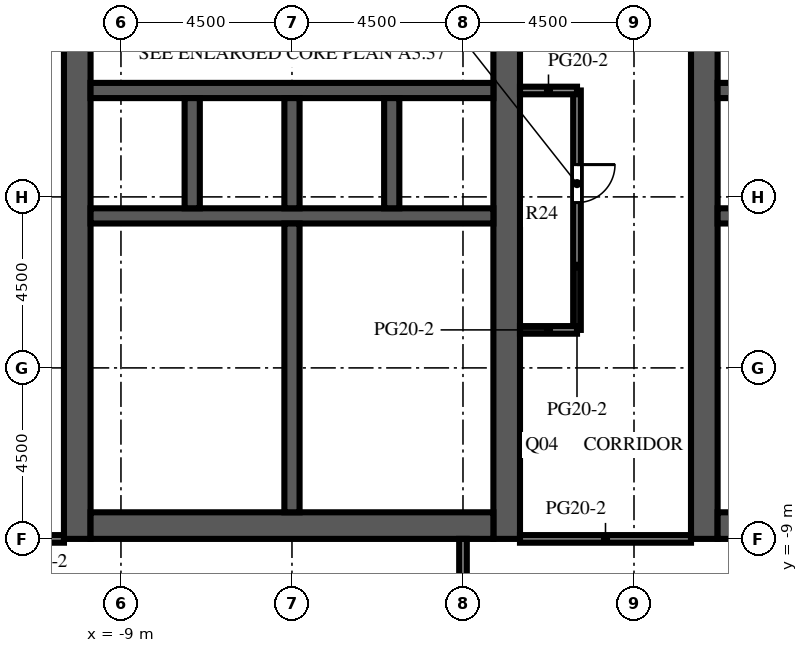
"""IFC4 building model, lengths in metres.
Left out: names, types, materials, properties, quantities, classifications, styles, units other than length and angle.
Written with IfcOpenShell. Run it as: python <this file> out.ifc"""

import sys

from ifc_helpers import new_model, si_unit, direction, frame, frame_2d, origin, place, context, subcontext, project, spatial, rectangle, extrude, element, fill, save


model = new_model("IFC4")
c1 = context("Model", 3, precision=1e-05, world=origin(), true_north=direction((0.0, 1.0)))
c2 = subcontext(c1, "Body", "Model", "MODEL_VIEW")
j1 = project(units=[si_unit("LENGTHUNIT", "METRE"), si_unit("PLANEANGLEUNIT", "RADIAN")], contexts=[c1])
p1 = place(None, origin())
s1 = spatial("IfcSite", under=j1, at=p1, CompositionType="ELEMENT")
p2 = place(p1, origin())
s2 = spatial("IfcBuilding", under=s1, at=p2, CompositionType="ELEMENT")
p3 = place(p2, frame((0.0, 0.0, 256.2)))
s3 = spatial("IfcBuildingStorey", under=s2, at=p3, CompositionType="ELEMENT", Elevation=256.2)
p4 = place(p3, frame((-10.15, -9.0, 0.0), z_axis=(0.0, 0.0, 1.0), x_axis=(0.0, 1.0, 0.0)))
e1 = element("IfcWall", 1, at=p4, inside=s3, PredefinedType="SHEAR", context=c2, shape_type="SweptSolid", body=[
    extrude(rectangle(XDim=27.5, YDim=0.7, at=frame_2d((13.75, 0.0))), origin(), (0.0, 0.0, 1.0), 4.1),
])
p5 = place(p4, frame((12.55, 0.0, 0.0)))
e2 = element("IfcOpeningElement", 2, at=p5, cuts=e1, PredefinedType="OPENING", context=c2, shape_type="SweptSolid", body=[
    extrude(rectangle(XDim=2.4, YDim=2.4, at=frame_2d((1.2, 1.2))), frame((0.0, 0.36, 0.0), z_axis=(0.0, -1.0, 0.0), x_axis=(1.0, 0.0, 0.0)), (0.0, 0.0, 1.0), 0.72),
])
p6 = place(p4, frame((6.825, 0.0, 0.0)))
e3 = element("IfcOpeningElement", 3, at=p6, cuts=e1, PredefinedType="OPENING", context=c2, shape_type="SweptSolid", body=[
    extrude(rectangle(XDim=1.2, YDim=2.1, at=frame_2d((0.6, 1.05))), frame((0.0, 0.36, 0.0), z_axis=(0.0, -1.0, 0.0), x_axis=(1.0, 0.0, 0.0)), (0.0, 0.0, 1.0), 0.72),
])
p7 = place(p4, frame((19.475, 0.0, 0.0)))
e4 = element("IfcOpeningElement", 4, at=p7, cuts=e1, PredefinedType="OPENING", context=c2, shape_type="SweptSolid", body=[
    extrude(rectangle(XDim=1.2, YDim=2.1, at=frame_2d((0.6, 1.05))), frame((0.0, 0.36, 0.0), z_axis=(0.0, -1.0, 0.0), x_axis=(1.0, 0.0, 0.0)), (0.0, 0.0, 1.0), 0.72),
])
p8 = place(p3, frame((1.15, -9.0, 0.0), z_axis=(0.0, 0.0, 1.0), x_axis=(0.0, 1.0, 0.0)))
e5 = element("IfcWall", 5, at=p8, inside=s3, PredefinedType="SHEAR", context=c2, shape_type="SweptSolid", body=[
    extrude(rectangle(XDim=27.5, YDim=0.7, at=frame_2d((13.75, 0.0))), origin(), (0.0, 0.0, 1.0), 4.1),
])
p9 = place(p8, frame((12.55, 0.0, 0.0)))
e6 = element("IfcOpeningElement", 6, at=p9, cuts=e5, PredefinedType="OPENING", context=c2, shape_type="SweptSolid", body=[
    extrude(rectangle(XDim=2.4, YDim=2.4, at=frame_2d((1.2, 1.2))), frame((0.0, 0.36, 0.0), z_axis=(0.0, -1.0, 0.0), x_axis=(1.0, 0.0, 0.0)), (0.0, 0.0, 1.0), 0.72),
])
p10 = place(p8, frame((3.788, 0.0, 0.0)))
e7 = element("IfcOpeningElement", 7, at=p10, cuts=e5, PredefinedType="OPENING", context=c2, shape_type="SweptSolid", body=[
    extrude(rectangle(XDim=0.968, YDim=2.1, at=frame_2d((0.484, 1.05))), frame((0.0, 0.36, 0.0), z_axis=(0.0, -1.0, 0.0), x_axis=(1.0, 0.0, 0.0)), (0.0, 0.0, 1.0), 0.72),
])
p11 = place(p8, frame((23.54, 0.0, 0.0)))
e8 = element("IfcOpeningElement", 8, at=p11, cuts=e5, PredefinedType="OPENING", context=c2, shape_type="SweptSolid", body=[
    extrude(rectangle(XDim=1.2, YDim=2.1, at=frame_2d((0.6, 1.05))), frame((0.0, 0.36, 0.0), z_axis=(0.0, -1.0, 0.0), x_axis=(1.0, 0.0, 0.0)), (0.0, 0.0, 1.0), 0.72),
])
p12 = place(p3, frame((-9.8, -8.65, 0.0), z_axis=(0.0, 0.0, 1.0), x_axis=(1.0, 0.0, 0.0)))
e9 = element("IfcWall", 9, at=p12, inside=s3, PredefinedType="SHEAR", context=c2, shape_type="SweptSolid", body=[
    extrude(rectangle(XDim=10.6, YDim=0.7, at=frame_2d((5.3, 0.0))), origin(), (0.0, 0.0, 1.0), 4.1),
])
p13 = place(p3, frame((-9.8, -0.5, 0.0), z_axis=(0.0, 0.0, 1.0), x_axis=(1.0, 0.0, 0.0)))
e10 = element("IfcWall", 10, at=p13, inside=s3, PredefinedType="SHEAR", context=c2, shape_type="SweptSolid", body=[
    extrude(rectangle(XDim=10.6, YDim=0.4, at=frame_2d((5.3, 0.0))), origin(), (0.0, 0.0, 1.0), 4.1),
])
p14 = place(p3, frame((-9.8, 2.8, 0.0), z_axis=(0.0, 0.0, 1.0), x_axis=(1.0, 0.0, 0.0)))
e11 = element("IfcWall", 11, at=p14, inside=s3, PredefinedType="SHEAR", context=c2, shape_type="SweptSolid", body=[
    extrude(rectangle(XDim=10.6, YDim=0.4, at=frame_2d((5.3, 0.0))), origin(), (0.0, 0.0, 1.0), 4.1),
])
p15 = place(p14, frame((0.688, 0.0, 0.0)))
e12 = element("IfcOpeningElement", 12, at=p15, cuts=e11, PredefinedType="OPENING", context=c2, shape_type="SweptSolid", body=[
    extrude(rectangle(XDim=1.1, YDim=2.1, at=frame_2d((0.55, 1.05))), frame((0.0, 0.21, 0.0), z_axis=(0.0, -1.0, 0.0), x_axis=(1.0, 0.0, 0.0)), (0.0, 0.0, 1.0), 0.42),
])
p16 = place(p14, frame((3.438, 0.0, 0.0)))
e13 = element("IfcOpeningElement", 13, at=p16, cuts=e11, PredefinedType="OPENING", context=c2, shape_type="SweptSolid", body=[
    extrude(rectangle(XDim=1.1, YDim=2.1, at=frame_2d((0.55, 1.05))), frame((0.0, 0.21, 0.0), z_axis=(0.0, -1.0, 0.0), x_axis=(1.0, 0.0, 0.0)), (0.0, 0.0, 1.0), 0.42),
])
p17 = place(p14, frame((6.113, 0.0, 0.0)))
e14 = element("IfcOpeningElement", 14, at=p17, cuts=e11, PredefinedType="OPENING", context=c2, shape_type="SweptSolid", body=[
    extrude(rectangle(XDim=1.0, YDim=2.1, at=frame_2d((0.5, 1.05))), frame((0.0, 0.21, 0.0), z_axis=(0.0, -1.0, 0.0), x_axis=(1.0, 0.0, 0.0)), (0.0, 0.0, 1.0), 0.42),
])
p18 = place(p14, frame((8.863, 0.0, 0.0)))
e15 = element("IfcOpeningElement", 15, at=p18, cuts=e11, PredefinedType="OPENING", context=c2, shape_type="SweptSolid", body=[
    extrude(rectangle(XDim=1.0, YDim=2.1, at=frame_2d((0.5, 1.05))), frame((0.0, 0.21, 0.0), z_axis=(0.0, -1.0, 0.0), x_axis=(1.0, 0.0, 0.0)), (0.0, 0.0, 1.0), 0.42),
])
for number, where, z_axis, x_axis in (
    (16, (-7.125, -0.3, 0.0), (0.0, 0.0, 1.0), (0.0, 1.0, 0.0)),
    (17, (-4.5, -0.3, 0.0), (0.0, 0.0, 1.0), (0.0, 1.0, 0.0)),
    (18, (-1.875, -0.3, 0.0), (0.0, 0.0, 1.0), (0.0, 1.0, 0.0)),
):
    element("IfcWall", number, at=place(p3, frame(where, z_axis=z_axis, x_axis=x_axis)), inside=s3, PredefinedType="SHEAR", context=c2, shape_type="SweptSolid", body=[
        extrude(rectangle(XDim=2.9, YDim=0.4, at=frame_2d((1.45, 0.0))), origin(), (0.0, 0.0, 1.0), 4.1),
    ])
p19 = place(p3, frame((-4.5, -8.3, 0.0), z_axis=(0.0, 0.0, 1.0), x_axis=(0.0, 1.0, 0.0)))
e19 = element("IfcWall", 19, at=p19, inside=s3, PredefinedType="SHEAR", context=c2, shape_type="SweptSolid", body=[
    extrude(rectangle(XDim=7.6, YDim=0.4, at=frame_2d((3.8, 0.0))), origin(), (0.0, 0.0, 1.0), 4.1),
])
p20 = place(p3, frame((6.35, -9.0, 0.0), z_axis=(0.0, 0.0, 1.0), x_axis=(0.0, 1.0, 0.0)))
e20 = element("IfcWall", 20, at=p20, inside=s3, PredefinedType="SHEAR", context=c2, shape_type="SweptSolid", body=[
    extrude(rectangle(XDim=27.5, YDim=0.7, at=frame_2d((13.75, 0.0))), origin(), (0.0, 0.0, 1.0), 4.1),
])
p21 = place(p20, frame((12.55, 0.0, 0.0)))
e21 = element("IfcOpeningElement", 21, at=p21, cuts=e20, PredefinedType="OPENING", context=c2, shape_type="SweptSolid", body=[
    extrude(rectangle(XDim=2.4, YDim=2.4, at=frame_2d((1.2, 1.2))), frame((0.0, 0.36, 0.0), z_axis=(0.0, -1.0, 0.0), x_axis=(1.0, 0.0, 0.0)), (0.0, 0.0, 1.0), 0.72),
])
p22 = place(p20, frame((3.788, 0.0, 0.0)))
e22 = element("IfcOpeningElement", 22, at=p22, cuts=e20, PredefinedType="OPENING", context=c2, shape_type="SweptSolid", body=[
    extrude(rectangle(XDim=0.968, YDim=2.1, at=frame_2d((0.484, 1.05))), frame((0.0, 0.36, 0.0), z_axis=(0.0, -1.0, 0.0), x_axis=(1.0, 0.0, 0.0)), (0.0, 0.0, 1.0), 0.72),
])
p23 = place(p20, frame((23.54, 0.0, 0.0)))
e23 = element("IfcOpeningElement", 23, at=p23, cuts=e20, PredefinedType="OPENING", context=c2, shape_type="SweptSolid", body=[
    extrude(rectangle(XDim=1.2, YDim=2.1, at=frame_2d((0.6, 1.05))), frame((0.0, 0.36, 0.0), z_axis=(0.0, -1.0, 0.0), x_axis=(1.0, 0.0, 0.0)), (0.0, 0.0, 1.0), 0.72),
])
p24 = place(p3, frame((6.7, -8.65, 0.0), z_axis=(0.0, 0.0, 1.0), x_axis=(1.0, 0.0, 0.0)))
e24 = element("IfcWall", 24, at=p24, inside=s3, PredefinedType="SHEAR", context=c2, shape_type="SweptSolid", body=[
    extrude(rectangle(XDim=10.6, YDim=0.7, at=frame_2d((5.3, 0.0))), origin(), (0.0, 0.0, 1.0), 4.1),
])
p25 = place(p3, frame((6.7, -0.5, 0.0), z_axis=(0.0, 0.0, 1.0), x_axis=(1.0, 0.0, 0.0)))
e25 = element("IfcWall", 25, at=p25, inside=s3, PredefinedType="SHEAR", context=c2, shape_type="SweptSolid", body=[
    extrude(rectangle(XDim=10.6, YDim=0.4, at=frame_2d((5.3, 0.0))), origin(), (0.0, 0.0, 1.0), 4.1),
])
p26 = place(p3, frame((6.7, 2.8, 0.0), z_axis=(0.0, 0.0, 1.0), x_axis=(1.0, 0.0, 0.0)))
e26 = element("IfcWall", 26, at=p26, inside=s3, PredefinedType="SHEAR", context=c2, shape_type="SweptSolid", body=[
    extrude(rectangle(XDim=10.6, YDim=0.4, at=frame_2d((5.3, 0.0))), origin(), (0.0, 0.0, 1.0), 4.1),
])
p27 = place(p26, frame((0.688, 0.0, 0.0)))
e27 = element("IfcOpeningElement", 27, at=p27, cuts=e26, PredefinedType="OPENING", context=c2, shape_type="SweptSolid", body=[
    extrude(rectangle(XDim=1.1, YDim=2.1, at=frame_2d((0.55, 1.05))), frame((0.0, 0.21, 0.0), z_axis=(0.0, -1.0, 0.0), x_axis=(1.0, 0.0, 0.0)), (0.0, 0.0, 1.0), 0.42),
])
p28 = place(p26, frame((3.438, 0.0, 0.0)))
e28 = element("IfcOpeningElement", 28, at=p28, cuts=e26, PredefinedType="OPENING", context=c2, shape_type="SweptSolid", body=[
    extrude(rectangle(XDim=1.1, YDim=2.1, at=frame_2d((0.55, 1.05))), frame((0.0, 0.21, 0.0), z_axis=(0.0, -1.0, 0.0), x_axis=(1.0, 0.0, 0.0)), (0.0, 0.0, 1.0), 0.42),
])
p29 = place(p26, frame((6.113, 0.0, 0.0)))
e29 = element("IfcOpeningElement", 29, at=p29, cuts=e26, PredefinedType="OPENING", context=c2, shape_type="SweptSolid", body=[
    extrude(rectangle(XDim=1.0, YDim=2.1, at=frame_2d((0.5, 1.05))), frame((0.0, 0.21, 0.0), z_axis=(0.0, -1.0, 0.0), x_axis=(1.0, 0.0, 0.0)), (0.0, 0.0, 1.0), 0.42),
])
p30 = place(p26, frame((8.863, 0.0, 0.0)))
e30 = element("IfcOpeningElement", 30, at=p30, cuts=e26, PredefinedType="OPENING", context=c2, shape_type="SweptSolid", body=[
    extrude(rectangle(XDim=1.0, YDim=2.1, at=frame_2d((0.5, 1.05))), frame((0.0, 0.21, 0.0), z_axis=(0.0, -1.0, 0.0), x_axis=(1.0, 0.0, 0.0)), (0.0, 0.0, 1.0), 0.42),
])
p31 = place(p3, frame((-4.3, -5.412, 0.0), z_axis=(0.0, 0.0, 1.0), x_axis=(1.0, 0.0, 0.0)))
e31 = element("IfcWall", 31, at=p31, inside=s3, PredefinedType="PARTITIONING", context=c2, shape_type="SweptSolid", body=[
    extrude(rectangle(XDim=5.1, YDim=0.1, at=frame_2d((2.55, 0.0))), origin(), (0.0, 0.0, 1.0), 3.5),
])
p32 = place(p31, frame((2.05, 0.0, 0.0)))
e32 = element("IfcOpeningElement", 32, at=p32, cuts=e31, PredefinedType="OPENING", context=c2, shape_type="SweptSolid", body=[
    extrude(rectangle(XDim=1.0, YDim=2.1, at=frame_2d((0.5, 1.05))), frame((0.0, 0.06, 0.0), z_axis=(0.0, -1.0, 0.0), x_axis=(1.0, 0.0, 0.0)), (0.0, 0.0, 1.0), 0.12),
])
p33 = place(p3, frame((-2.362, -4.044, 0.0), z_axis=(0.0, 0.0, 1.0), x_axis=(1.0, 0.0, 0.0)))
e33 = element("IfcWall", 33, at=p33, inside=s3, PredefinedType="PARTITIONING", context=c2, shape_type="SweptSolid", body=[
    extrude(rectangle(XDim=3.162, YDim=0.1, at=frame_2d((1.581, 0.0))), origin(), (0.0, 0.0, 1.0), 3.5),
])
p34 = place(p33, frame((1.081, 0.0, 0.0)))
e34 = element("IfcOpeningElement", 34, at=p34, cuts=e33, PredefinedType="OPENING", context=c2, shape_type="SweptSolid", body=[
    extrude(rectangle(XDim=1.0, YDim=2.1, at=frame_2d((0.5, 1.05))), frame((0.0, 0.06, 0.0), z_axis=(0.0, -1.0, 0.0), x_axis=(1.0, 0.0, 0.0)), (0.0, 0.0, 1.0), 0.12),
])
p35 = place(p3, frame((-4.3, -4.044, 0.0), z_axis=(0.0, 0.0, 1.0), x_axis=(1.0, 0.0, 0.0)))
e35 = element("IfcWall", 35, at=p35, inside=s3, PredefinedType="PARTITIONING", context=c2, shape_type="SweptSolid", body=[
    extrude(rectangle(XDim=1.938, YDim=0.1, at=frame_2d((0.969, 0.0))), origin(), (0.0, 0.0, 1.0), 3.5),
])
p36 = place(p35, frame((0.469, 0.0, 0.0)))
e36 = element("IfcOpeningElement", 36, at=p36, cuts=e35, PredefinedType="OPENING", context=c2, shape_type="SweptSolid", body=[
    extrude(rectangle(XDim=1.0, YDim=2.1, at=frame_2d((0.5, 1.05))), frame((0.0, 0.06, 0.0), z_axis=(0.0, -1.0, 0.0), x_axis=(1.0, 0.0, 0.0)), (0.0, 0.0, 1.0), 0.12),
])
p37 = place(p3, frame((-2.362, -4.044, 0.0), z_axis=(0.0, 0.0, 1.0), x_axis=(0.0, 1.0, 0.0)))
e37 = element("IfcWall", 37, at=p37, inside=s3, PredefinedType="PARTITIONING", context=c2, shape_type="SweptSolid", body=[
    extrude(rectangle(XDim=3.344, YDim=0.1, at=frame_2d((1.672, 0.0))), origin(), (0.0, 0.0, 1.0), 3.5),
])
p38 = place(p3, frame((6.7, -5.412, 0.0), z_axis=(0.0, 0.0, 1.0), x_axis=(1.0, 0.0, 0.0)))
e38 = element("IfcWall", 38, at=p38, inside=s3, PredefinedType="PARTITIONING", context=c2, shape_type="SweptSolid", body=[
    extrude(rectangle(XDim=5.1, YDim=0.1, at=frame_2d((2.55, 0.0))), origin(), (0.0, 0.0, 1.0), 3.5),
])
p39 = place(p38, frame((2.05, 0.0, 0.0)))
e39 = element("IfcOpeningElement", 39, at=p39, cuts=e38, PredefinedType="OPENING", context=c2, shape_type="SweptSolid", body=[
    extrude(rectangle(XDim=1.0, YDim=2.1, at=frame_2d((0.5, 1.05))), frame((0.0, 0.06, 0.0), z_axis=(0.0, -1.0, 0.0), x_axis=(1.0, 0.0, 0.0)), (0.0, 0.0, 1.0), 0.12),
])
p40 = place(p3, frame((6.7, -4.044, 0.0), z_axis=(0.0, 0.0, 1.0), x_axis=(1.0, 0.0, 0.0)))
e40 = element("IfcWall", 40, at=p40, inside=s3, PredefinedType="PARTITIONING", context=c2, shape_type="SweptSolid", body=[
    extrude(rectangle(XDim=3.162, YDim=0.1, at=frame_2d((1.581, 0.0))), origin(), (0.0, 0.0, 1.0), 3.5),
])
p41 = place(p40, frame((1.081, 0.0, 0.0)))
e41 = element("IfcOpeningElement", 41, at=p41, cuts=e40, PredefinedType="OPENING", context=c2, shape_type="SweptSolid", body=[
    extrude(rectangle(XDim=1.0, YDim=2.1, at=frame_2d((0.5, 1.05))), frame((0.0, 0.06, 0.0), z_axis=(0.0, -1.0, 0.0), x_axis=(1.0, 0.0, 0.0)), (0.0, 0.0, 1.0), 0.12),
])
p42 = place(p3, frame((0.0, -17.5, 0.0), z_axis=(0.0, 0.0, 1.0), x_axis=(0.0, 1.0, 0.0)))
e42 = element("IfcWall", 42, at=p42, inside=s3, PredefinedType="PARTITIONING", context=c2, shape_type="SweptSolid", body=[
    extrude(rectangle(XDim=8.5, YDim=0.2, at=frame_2d((4.25, 0.0))), origin(), (0.0, 0.0, 1.0), 3.5),
])
p43 = place(p3, frame((3.0, -3.5, 0.0), z_axis=(0.0, 0.0, 1.0), x_axis=(0.0, 1.0, 0.0)))
e43 = element("IfcWall", 43, at=p43, inside=s3, PredefinedType="PARTITIONING", context=c2, shape_type="SweptSolid", body=[
    extrude(rectangle(XDim=6.3, YDim=0.2, at=frame_2d((3.15, 0.0))), origin(), (0.0, 0.0, 1.0), 3.5),
])
p44 = place(p43, frame((3.35, 0.0, 0.0)))
e44 = element("IfcOpeningElement", 44, at=p44, cuts=e43, PredefinedType="OPENING", context=c2, shape_type="SweptSolid", body=[
    extrude(rectangle(XDim=1.0, YDim=2.1, at=frame_2d((0.5, 1.05))), frame((0.0, 0.11, 0.0), z_axis=(0.0, -1.0, 0.0), x_axis=(1.0, 0.0, 0.0)), (0.0, 0.0, 1.0), 0.22),
])
p45 = place(p3, frame((-10.5, -9.0, 0.0), z_axis=(0.0, 0.0, 1.0), x_axis=(-1.0, 0.0, 0.0)))
e45 = element("IfcWall", 45, at=p45, inside=s3, PredefinedType="PARTITIONING", context=c2, shape_type="SweptSolid", body=[
    extrude(rectangle(XDim=3.0, YDim=0.2, at=frame_2d((1.5, 0.0))), origin(), (0.0, 0.0, 1.0), 3.5),
])
p46 = place(p45, frame((1.4, 0.0, 0.0)))
e46 = element("IfcOpeningElement", 46, at=p46, cuts=e45, PredefinedType="OPENING", context=c2, shape_type="SweptSolid", body=[
    extrude(rectangle(XDim=1.0, YDim=2.1, at=frame_2d((0.5, 1.05))), frame((0.0, 0.11, 0.0), z_axis=(0.0, -1.0, 0.0), x_axis=(1.0, 0.0, 0.0)), (0.0, 0.0, 1.0), 0.22),
])
p47 = place(p3, frame((1.5, -9.0, 0.0), z_axis=(0.0, 0.0, 1.0), x_axis=(1.0, 0.0, 0.0)))
e47 = element("IfcWall", 47, at=p47, inside=s3, PredefinedType="PARTITIONING", context=c2, shape_type="SweptSolid", body=[
    extrude(rectangle(XDim=4.5, YDim=0.2, at=frame_2d((2.25, 0.0))), origin(), (0.0, 0.0, 1.0), 3.5),
])
for number, where, z_axis, x_axis in (
    (48, (1.5, -3.5, 0.0), (0.0, 0.0, 1.0), (1.0, 0.0, 0.0)),
    (49, (1.5, 2.8, 0.0), (0.0, 0.0, 1.0), (1.0, 0.0, 0.0)),
):
    element("IfcWall", number, at=place(p3, frame(where, z_axis=z_axis, x_axis=x_axis)), inside=s3, PredefinedType="PARTITIONING", context=c2, shape_type="SweptSolid", body=[
        extrude(rectangle(XDim=1.5, YDim=0.2, at=frame_2d((0.75, 0.0))), origin(), (0.0, 0.0, 1.0), 3.5),
    ])
p48 = place(p15, origin())
e50 = element("IfcDoor", 50, at=p48, inside=s3, OperationType="DOUBLE_DOOR_SLIDING", PredefinedType="DOOR", context=c2, shape_type="SweptSolid", body=[
    extrude(rectangle(XDim=1.1, YDim=2.1, at=frame_2d((0.55, 1.05))), frame((0.0, 0.025, 0.0), z_axis=(0.0, -1.0, 0.0), x_axis=(1.0, 0.0, 0.0)), (0.0, 0.0, 1.0), 0.05),
])
fill(e12, e50)
p49 = place(p16, origin())
e51 = element("IfcDoor", 51, at=p49, inside=s3, OperationType="DOUBLE_DOOR_SLIDING", PredefinedType="DOOR", context=c2, shape_type="SweptSolid", body=[
    extrude(rectangle(XDim=1.1, YDim=2.1, at=frame_2d((0.55, 1.05))), frame((0.0, 0.025, 0.0), z_axis=(0.0, -1.0, 0.0), x_axis=(1.0, 0.0, 0.0)), (0.0, 0.0, 1.0), 0.05),
])
fill(e13, e51)
p50 = place(p5, origin())
e52 = element("IfcDoor", 52, at=p50, inside=s3, OperationType="DOUBLE_DOOR_DOUBLE_SWING", PredefinedType="DOOR", context=c2, shape_type="SweptSolid", body=[
    extrude(rectangle(XDim=2.4, YDim=2.4, at=frame_2d((1.2, 1.2))), frame((0.0, 0.025, 0.0), z_axis=(0.0, -1.0, 0.0), x_axis=(1.0, 0.0, 0.0)), (0.0, 0.0, 1.0), 0.05),
])
fill(e2, e52)
p51 = place(p9, origin())
e53 = element("IfcDoor", 53, at=p51, inside=s3, OperationType="DOUBLE_DOOR_DOUBLE_SWING", PredefinedType="DOOR", context=c2, shape_type="SweptSolid", body=[
    extrude(rectangle(XDim=2.4, YDim=2.4, at=frame_2d((1.2, 1.2))), frame((0.0, 0.025, 0.0), z_axis=(0.0, -1.0, 0.0), x_axis=(1.0, 0.0, 0.0)), (0.0, 0.0, 1.0), 0.05),
])
fill(e6, e53)
p52 = place(p21, origin())
e54 = element("IfcDoor", 54, at=p52, inside=s3, OperationType="DOUBLE_DOOR_DOUBLE_SWING", PredefinedType="DOOR", context=c2, shape_type="SweptSolid", body=[
    extrude(rectangle(XDim=2.4, YDim=2.4, at=frame_2d((1.2, 1.2))), frame((0.0, 0.025, 0.0), z_axis=(0.0, -1.0, 0.0), x_axis=(1.0, 0.0, 0.0)), (0.0, 0.0, 1.0), 0.05),
])
fill(e21, e54)
p53 = place(p6, origin())
e55 = element("IfcDoor", 55, at=p53, inside=s3, OperationType="SINGLE_SWING_LEFT", PredefinedType="DOOR", context=c2, shape_type="SweptSolid", body=[
    extrude(rectangle(XDim=1.2, YDim=2.1, at=frame_2d((0.6, 1.05))), frame((0.0, 0.025, 0.0), z_axis=(0.0, -1.0, 0.0), x_axis=(1.0, 0.0, 0.0)), (0.0, 0.0, 1.0), 0.05),
])
fill(e3, e55)
p54 = place(p17, origin())
e56 = element("IfcDoor", 56, at=p54, inside=s3, OperationType="SINGLE_SWING_LEFT", PredefinedType="DOOR", context=c2, shape_type="SweptSolid", body=[
    extrude(rectangle(XDim=1.0, YDim=2.1, at=frame_2d((0.5, 1.05))), frame((0.0, 0.025, 0.0), z_axis=(0.0, -1.0, 0.0), x_axis=(1.0, 0.0, 0.0)), (0.0, 0.0, 1.0), 0.05),
])
fill(e14, e56)
p55 = place(p18, origin())
e57 = element("IfcDoor", 57, at=p55, inside=s3, OperationType="SINGLE_SWING_RIGHT", PredefinedType="DOOR", context=c2, shape_type="SweptSolid", body=[
    extrude(rectangle(XDim=1.0, YDim=2.1, at=frame_2d((0.5, 1.05))), frame((0.0, 0.025, 0.0), z_axis=(0.0, -1.0, 0.0), x_axis=(1.0, 0.0, 0.0)), (0.0, 0.0, 1.0), 0.05),
])
fill(e15, e57)
p56 = place(p10, origin())
e58 = element("IfcDoor", 58, at=p56, inside=s3, OperationType="SINGLE_SWING_LEFT", PredefinedType="DOOR", context=c2, shape_type="SweptSolid", body=[
    extrude(rectangle(XDim=0.968, YDim=2.1, at=frame_2d((0.484, 1.05))), frame((0.0, 0.325, 0.0), z_axis=(0.0, -1.0, 0.0), x_axis=(1.0, 0.0, 0.0)), (0.0, 0.0, 1.0), 0.05),
])
fill(e7, e58)
p57 = place(p32, origin())
e59 = element("IfcDoor", 59, at=p57, inside=s3, OperationType="SINGLE_SWING_RIGHT", PredefinedType="DOOR", context=c2, shape_type="SweptSolid", body=[
    extrude(rectangle(XDim=1.0, YDim=2.1, at=frame_2d((0.5, 1.05))), frame((0.0, 0.025, 0.0), z_axis=(0.0, -1.0, 0.0), x_axis=(1.0, 0.0, 0.0)), (0.0, 0.0, 1.0), 0.05),
])
fill(e32, e59)
p58 = place(p34, origin())
e60 = element("IfcDoor", 60, at=p58, inside=s3, OperationType="SINGLE_SWING_LEFT", PredefinedType="DOOR", context=c2, shape_type="SweptSolid", body=[
    extrude(rectangle(XDim=1.0, YDim=2.1, at=frame_2d((0.5, 1.05))), frame((0.0, 0.025, 0.0), z_axis=(0.0, -1.0, 0.0), x_axis=(1.0, 0.0, 0.0)), (0.0, 0.0, 1.0), 0.05),
])
fill(e34, e60)
p59 = place(p36, origin())
e61 = element("IfcDoor", 61, at=p59, inside=s3, OperationType="SINGLE_SWING_RIGHT", PredefinedType="DOOR", context=c2, shape_type="SweptSolid", body=[
    extrude(rectangle(XDim=1.0, YDim=2.1, at=frame_2d((0.5, 1.05))), frame((0.0, 0.025, 0.0), z_axis=(0.0, -1.0, 0.0), x_axis=(1.0, 0.0, 0.0)), (0.0, 0.0, 1.0), 0.05),
])
fill(e36, e61)
p60 = place(p22, origin())
e62 = element("IfcDoor", 62, at=p60, inside=s3, OperationType="SINGLE_SWING_RIGHT", PredefinedType="DOOR", context=c2, shape_type="SweptSolid", body=[
    extrude(rectangle(XDim=0.968, YDim=2.1, at=frame_2d((0.484, 1.05))), frame((0.0, -0.275, 0.0), z_axis=(0.0, -1.0, 0.0), x_axis=(1.0, 0.0, 0.0)), (0.0, 0.0, 1.0), 0.05),
])
fill(e22, e62)
p61 = place(p44, origin())
e63 = element("IfcDoor", 63, at=p61, inside=s3, OperationType="SINGLE_SWING_RIGHT", PredefinedType="DOOR", context=c2, shape_type="SweptSolid", body=[
    extrude(rectangle(XDim=1.0, YDim=2.1, at=frame_2d((0.5, 1.05))), frame((0.0, 0.025, 0.0), z_axis=(0.0, -1.0, 0.0), x_axis=(1.0, 0.0, 0.0)), (0.0, 0.0, 1.0), 0.05),
])
fill(e44, e63)
save(model, sys.argv[1])
